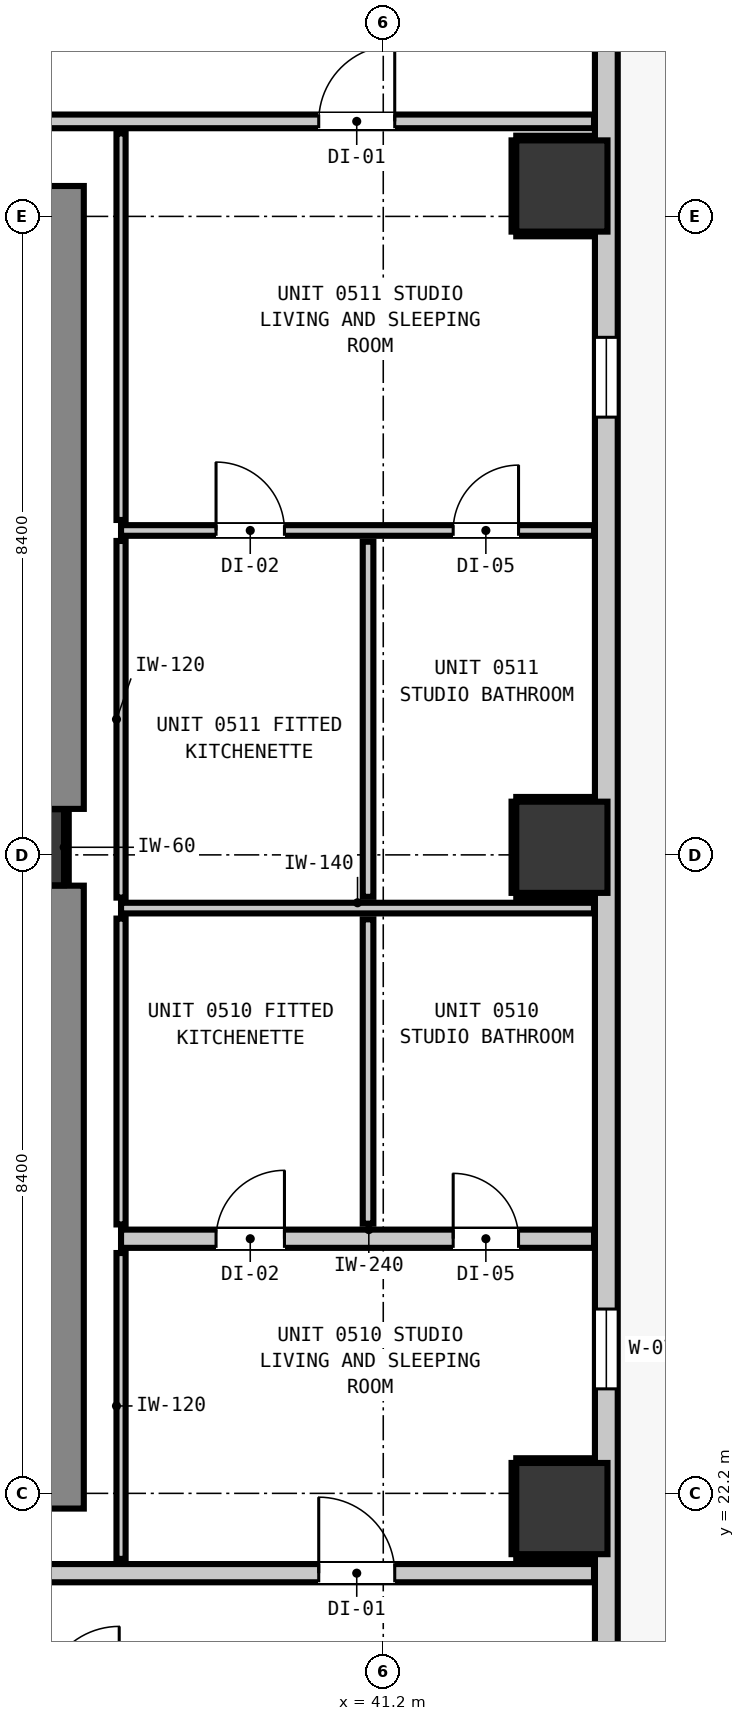
"""IFC4 building model, lengths in metres.
Left out: names, types, materials, properties, quantities, classifications, styles, units other than length and angle.
Written with IfcOpenShell. Run it as: python <this file> out.ifc"""

import sys

from ifc_helpers import new_model, si_unit, direction, frame, frame_2d, origin, origin_2d, place, context, subcontext, project, spatial, rectangle, extrude, element, fill, save


model = new_model("IFC4")
c1 = context("Model", 3, precision=1e-05, world=origin(), true_north=direction((0.0, 1.0)))
c2 = subcontext(c1, "Body", "Model", "MODEL_VIEW")
j1 = project(units=[si_unit("LENGTHUNIT", "METRE"), si_unit("PLANEANGLEUNIT", "RADIAN")], contexts=[c1])
p1 = place(None, origin())
s1 = spatial("IfcSite", under=j1, at=p1, CompositionType="ELEMENT")
p2 = place(p1, origin())
s2 = spatial("IfcBuilding", under=s1, at=p2, CompositionType="ELEMENT")
p3 = place(p2, frame((0.0, 0.0, 22.0)))
s3 = spatial("IfcBuildingStorey", under=s2, at=p3, CompositionType="ELEMENT", Elevation=22.0)
p4 = place(p3, frame((36.5, 30.7, 0.0), z_axis=(0.0, 0.0, 1.0), x_axis=(1.0, 0.0, 0.0)))
e1 = element("IfcColumn", 1, at=p4, inside=s3, PredefinedType="COLUMN", context=c2, shape_type="SweptSolid", body=[
    extrude(rectangle(XDim=1.0, YDim=1.0, at=origin_2d()), origin(), (0.0, 0.0, 1.0), 3.32),
])
p5 = place(p3, frame((36.66, 22.0, 0.0), z_axis=(0.0, 0.0, 1.0), x_axis=(0.0, 1.0, 0.0)))
e2 = element("IfcWall", 2, at=p5, inside=s3, PredefinedType="SHEAR", context=c2, shape_type="SweptSolid", body=[
    extrude(rectangle(XDim=8.195, YDim=1.2, at=frame_2d((4.098, 0.0))), origin(), (0.0, 0.0, 1.0), 3.32),
])
p6 = place(p3, frame((36.66, 31.205, 0.0), z_axis=(0.0, 0.0, 1.0), x_axis=(0.0, 1.0, 0.0)))
e3 = element("IfcWall", 3, at=p6, inside=s3, PredefinedType="SHEAR", context=c2, shape_type="SweptSolid", body=[
    extrude(rectangle(XDim=8.195, YDim=1.2, at=frame_2d((4.097, 0.0))), origin(), (0.0, 0.0, 1.0), 3.32),
])
for number, where, z_axis, x_axis in (
    (4, (43.55, 22.0, -0.2), (0.0, 0.0, 1.0), (1.0, 0.0, 0.0)),
    (5, (43.55, 30.7, -0.2), (0.0, 0.0, 1.0), (1.0, 0.0, 0.0)),
    (6, (43.55, 39.4, -0.2), (0.0, 0.0, 1.0), (1.0, 0.0, 0.0)),
):
    element("IfcColumn", number, at=place(p3, frame(where, z_axis=z_axis, x_axis=x_axis)), inside=s3, PredefinedType="COLUMN", context=c2, shape_type="SweptSolid", body=[
        extrude(rectangle(XDim=1.2, YDim=1.2, at=origin_2d()), origin(), (0.0, 0.0, 1.0), 3.52),
    ])
p7 = place(p3, frame((44.135, 44.835, 0.0), z_axis=(0.0, 0.0, 1.0), x_axis=(0.0, -1.0, 0.0)))
e7 = element("IfcWall", 7, at=p7, inside=s3, PredefinedType="STANDARD", context=c2, shape_type="SweptSolid", body=[
    extrude(rectangle(XDim=34.67, YDim=0.3, at=frame_2d((17.335, 0.0))), origin(), (0.0, 0.0, 1.0), 3.06),
])
p8 = place(p7, frame((0.501, 0.0, 0.0)))
e8 = element("IfcOpeningElement", 8, at=p8, cuts=e7, PredefinedType="OPENING", context=c2, shape_type="SweptSolid", body=[
    extrude(rectangle(XDim=1.1, YDim=2.15, at=frame_2d((0.55, 1.075))), frame((0.0, 0.16, 0.0), z_axis=(0.0, -1.0, 0.0), x_axis=(1.0, 0.0, 0.0)), (0.0, 0.0, 1.0), 0.32),
])
p9 = place(p7, frame((20.21, 0.0, 0.85)))
e9 = element("IfcOpeningElement", 9, at=p9, cuts=e7, PredefinedType="OPENING", context=c2, shape_type="SweptSolid", body=[
    extrude(rectangle(XDim=1.05, YDim=1.65, at=frame_2d((0.525, 0.825))), frame((0.0, 0.16, 0.0), z_axis=(0.0, -1.0, 0.0), x_axis=(1.0, 0.0, 0.0)), (0.0, 0.0, 1.0), 0.32),
])
p10 = place(p7, frame((7.426, 0.0, 0.85)))
e10 = element("IfcOpeningElement", 10, at=p10, cuts=e7, PredefinedType="OPENING", context=c2, shape_type="SweptSolid", body=[
    extrude(rectangle(XDim=1.05, YDim=1.65, at=frame_2d((0.525, 0.825))), frame((0.0, 0.16, 0.0), z_axis=(0.0, -1.0, 0.0), x_axis=(1.0, 0.0, 0.0)), (0.0, 0.0, 1.0), 0.32),
])
p11 = place(p3, frame((1.827, 21.15, 0.0), z_axis=(0.0, 0.0, 1.0), x_axis=(1.0, 0.0, 0.0)))
e11 = element("IfcWall", 11, at=p11, inside=s3, PredefinedType="PARTITIONING", context=c2, shape_type="SweptSolid", body=[
    extrude(rectangle(XDim=42.146, YDim=0.24, at=frame_2d((21.073, 0.0))), origin(), (0.0, 0.0, 1.0), 3.06),
])
p12 = place(p11, frame((16.383, 0.0, 0.0)))
e12 = element("IfcOpeningElement", 12, at=p12, cuts=e11, PredefinedType="OPENING", context=c2, shape_type="SweptSolid", body=[
    extrude(rectangle(XDim=1.1, YDim=2.15, at=frame_2d((0.55, 1.075))), frame((0.0, 0.13, 0.0), z_axis=(0.0, -1.0, 0.0), x_axis=(1.0, 0.0, 0.0)), (0.0, 0.0, 1.0), 0.26),
])
p13 = place(p11, frame((8.647, 0.0, 0.0)))
e13 = element("IfcOpeningElement", 13, at=p13, cuts=e11, PredefinedType="OPENING", context=c2, shape_type="SweptSolid", body=[
    extrude(rectangle(XDim=1.4, YDim=2.15, at=frame_2d((0.7, 1.075))), frame((0.0, 0.13, 0.0), z_axis=(0.0, -1.0, 0.0), x_axis=(1.0, 0.0, 0.0)), (0.0, 0.0, 1.0), 0.26),
])
p14 = place(p11, frame((38.524, 0.0, 0.0)))
e14 = element("IfcOpeningElement", 14, at=p14, cuts=e11, PredefinedType="OPENING", context=c2, shape_type="SweptSolid", body=[
    extrude(rectangle(XDim=1.0, YDim=2.15, at=frame_2d((0.5, 1.075))), frame((0.0, 0.13, 0.0), z_axis=(0.0, -1.0, 0.0), x_axis=(1.0, 0.0, 0.0)), (0.0, 0.0, 1.0), 0.26),
])
p15 = place(p3, frame((37.75, 25.55, 0.0), z_axis=(0.0, 0.0, 1.0), x_axis=(1.0, 0.0, 0.0)))
e15 = element("IfcWall", 15, at=p15, inside=s3, PredefinedType="PARTITIONING", context=c2, shape_type="SweptSolid", body=[
    extrude(rectangle(XDim=6.223, YDim=0.24, at=frame_2d((3.111, 0.0))), origin(), (0.0, 0.0, 1.0), 3.06),
])
p16 = place(p15, frame((1.25, 0.0, 0.0)))
e16 = element("IfcOpeningElement", 16, at=p16, cuts=e15, PredefinedType="OPENING", context=c2, shape_type="SweptSolid", body=[
    extrude(rectangle(XDim=0.9, YDim=2.1, at=frame_2d((0.45, 1.05))), frame((0.0, 0.13, 0.0), z_axis=(0.0, -1.0, 0.0), x_axis=(1.0, 0.0, 0.0)), (0.0, 0.0, 1.0), 0.26),
])
p17 = place(p15, frame((4.37, 0.0, 0.0)))
e17 = element("IfcOpeningElement", 17, at=p17, cuts=e15, PredefinedType="OPENING", context=c2, shape_type="SweptSolid", body=[
    extrude(rectangle(XDim=0.86, YDim=2.02, at=frame_2d((0.43, 1.01))), frame((0.0, 0.13, 0.0), z_axis=(0.0, -1.0, 0.0), x_axis=(1.0, 0.0, 0.0)), (0.0, 0.0, 1.0), 0.26),
])
p18 = place(p3, frame((12.989, 40.25, 0.0), z_axis=(0.0, 0.0, 1.0), x_axis=(1.0, 0.0, 0.0)))
e18 = element("IfcWall", 18, at=p18, inside=s3, PredefinedType="PARTITIONING", context=c2, shape_type="SweptSolid", body=[
    extrude(rectangle(XDim=30.984, YDim=0.18, at=frame_2d((15.492, 0.0))), origin(), (0.0, 0.0, 1.0), 3.06),
])
p19 = place(p18, frame((4.446, 0.0, 0.0)))
e19 = element("IfcOpeningElement", 19, at=p19, cuts=e18, PredefinedType="OPENING", context=c2, shape_type="SweptSolid", body=[
    extrude(rectangle(XDim=1.4, YDim=2.15, at=frame_2d((0.7, 1.075))), frame((0.0, 0.1, 0.0), z_axis=(0.0, -1.0, 0.0), x_axis=(1.0, 0.0, 0.0)), (0.0, 0.0, 1.0), 0.2),
])
p20 = place(p18, frame((27.362, 0.0, 0.0)))
e20 = element("IfcOpeningElement", 20, at=p20, cuts=e18, PredefinedType="OPENING", context=c2, shape_type="SweptSolid", body=[
    extrude(rectangle(XDim=1.0, YDim=2.15, at=frame_2d((0.5, 1.075))), frame((0.0, 0.1, 0.0), z_axis=(0.0, -1.0, 0.0), x_axis=(1.0, 0.0, 0.0)), (0.0, 0.0, 1.0), 0.2),
])
p21 = place(p3, frame((37.75, 29.9, 0.0), z_axis=(0.0, 0.0, 1.0), x_axis=(1.0, 0.0, 0.0)))
e21 = element("IfcWall", 21, at=p21, inside=s3, PredefinedType="PARTITIONING", context=c2, shape_type="SweptSolid", body=[
    extrude(rectangle(XDim=6.223, YDim=0.14, at=frame_2d((3.111, 0.0))), origin(), (0.0, 0.0, 1.0), 3.06),
])
p22 = place(p3, frame((37.75, 34.868, 0.0), z_axis=(0.0, 0.0, 1.0), x_axis=(1.0, 0.0, 0.0)))
e22 = element("IfcWall", 22, at=p22, inside=s3, PredefinedType="PARTITIONING", context=c2, shape_type="SweptSolid", body=[
    extrude(rectangle(XDim=6.223, YDim=0.14, at=frame_2d((3.111, 0.0))), origin(), (0.0, 0.0, 1.0), 3.06),
])
p23 = place(p22, frame((1.25, 0.0, 0.0)))
e23 = element("IfcOpeningElement", 23, at=p23, cuts=e22, PredefinedType="OPENING", context=c2, shape_type="SweptSolid", body=[
    extrude(rectangle(XDim=0.9, YDim=2.1, at=frame_2d((0.45, 1.05))), frame((0.0, 0.08, 0.0), z_axis=(0.0, -1.0, 0.0), x_axis=(1.0, 0.0, 0.0)), (0.0, 0.0, 1.0), 0.16),
])
p24 = place(p22, frame((4.37, 0.0, 0.0)))
e24 = element("IfcOpeningElement", 24, at=p24, cuts=e22, PredefinedType="OPENING", context=c2, shape_type="SweptSolid", body=[
    extrude(rectangle(XDim=0.86, YDim=2.02, at=frame_2d((0.43, 1.01))), frame((0.0, 0.08, 0.0), z_axis=(0.0, -1.0, 0.0), x_axis=(1.0, 0.0, 0.0)), (0.0, 0.0, 1.0), 0.16),
])
p25 = place(p3, frame((41.0, 25.748, 0.0), z_axis=(0.0, 0.0, 1.0), x_axis=(0.0, 1.0, 0.0)))
e25 = element("IfcWall", 25, at=p25, inside=s3, PredefinedType="PARTITIONING", context=c2, shape_type="SweptSolid", body=[
    extrude(rectangle(XDim=4.004, YDim=0.14, at=frame_2d((2.002, 0.0))), origin(), (0.0, 0.0, 1.0), 3.06),
])
p26 = place(p3, frame((41.0, 30.048, 0.0), z_axis=(0.0, 0.0, 1.0), x_axis=(0.0, 1.0, 0.0)))
e26 = element("IfcWall", 26, at=p26, inside=s3, PredefinedType="PARTITIONING", context=c2, shape_type="SweptSolid", body=[
    extrude(rectangle(XDim=4.672, YDim=0.14, at=frame_2d((2.336, 0.0))), origin(), (0.0, 0.0, 1.0), 3.06),
])
p27 = place(p3, frame((37.75, 21.338, 0.0), z_axis=(0.0, 0.0, 1.0), x_axis=(0.0, 1.0, 0.0)))
e27 = element("IfcWall", 27, at=p27, inside=s3, PredefinedType="PARTITIONING", context=c2, shape_type="SweptSolid", body=[
    extrude(rectangle(XDim=4.024, YDim=0.12, at=frame_2d((2.012, 0.0))), origin(), (0.0, 0.0, 1.0), 3.06),
])
p28 = place(p3, frame((37.75, 25.738, 0.0), z_axis=(0.0, 0.0, 1.0), x_axis=(0.0, 1.0, 0.0)))
e28 = element("IfcWall", 28, at=p28, inside=s3, PredefinedType="PARTITIONING", context=c2, shape_type="SweptSolid", body=[
    extrude(rectangle(XDim=4.024, YDim=0.12, at=frame_2d((2.012, 0.0))), origin(), (0.0, 0.0, 1.0), 3.06),
])
p29 = place(p3, frame((37.75, 30.038, 0.0), z_axis=(0.0, 0.0, 1.0), x_axis=(0.0, 1.0, 0.0)))
e29 = element("IfcWall", 29, at=p29, inside=s3, PredefinedType="PARTITIONING", context=c2, shape_type="SweptSolid", body=[
    extrude(rectangle(XDim=4.692, YDim=0.12, at=frame_2d((2.346, 0.0))), origin(), (0.0, 0.0, 1.0), 3.06),
])
p30 = place(p3, frame((37.75, 35.006, 0.0), z_axis=(0.0, 0.0, 1.0), x_axis=(0.0, 1.0, 0.0)))
e30 = element("IfcWall", 30, at=p30, inside=s3, PredefinedType="PARTITIONING", context=c2, shape_type="SweptSolid", body=[
    extrude(rectangle(XDim=5.086, YDim=0.12, at=frame_2d((2.543, 0.0))), origin(), (0.0, 0.0, 1.0), 3.06),
])
p31 = place(p3, frame((37.032, 30.21, 0.0), z_axis=(0.0, 0.0, 1.0), x_axis=(0.0, 1.0, 0.0)))
e31 = element("IfcWall", 31, at=p31, inside=s3, PredefinedType="PARTITIONING", context=c2, shape_type="SweptSolid", body=[
    extrude(rectangle(XDim=0.98, YDim=0.06, at=frame_2d((0.49, 0.0))), origin(), (0.0, 0.0, 1.0), 1.45),
])
for number, where, z_axis, x_axis in (
    (32, (42.95, 21.368, 0.0), (0.0, 0.0, 1.0), (1.0, 0.0, 0.0)),
    (33, (42.95, 22.632, 0.0), (0.0, 0.0, 1.0), (1.0, 0.0, 0.0)),
):
    element("IfcWall", number, at=place(p3, frame(where, z_axis=z_axis, x_axis=x_axis)), inside=s3, PredefinedType="PARTITIONING", context=c2, shape_type="SweptSolid", body=[
        extrude(rectangle(XDim=1.02, YDim=0.06, at=frame_2d((0.51, 0.0))), origin(), (0.0, 0.0, 1.0), 1.45),
    ])
p32 = place(p3, frame((42.918, 21.4, 0.0), z_axis=(0.0, 0.0, 1.0), x_axis=(0.0, 1.0, 0.0)))
e34 = element("IfcWall", 34, at=p32, inside=s3, PredefinedType="PARTITIONING", context=c2, shape_type="SweptSolid", body=[
    extrude(rectangle(XDim=1.2, YDim=0.06, at=frame_2d((0.6, 0.0))), origin(), (0.0, 0.0, 1.0), 1.45),
])
for number, where, z_axis, x_axis in (
    (35, (42.95, 30.068, 0.0), (0.0, 0.0, 1.0), (1.0, 0.0, 0.0)),
    (36, (42.95, 31.332, 0.0), (0.0, 0.0, 1.0), (1.0, 0.0, 0.0)),
):
    element("IfcWall", number, at=place(p3, frame(where, z_axis=z_axis, x_axis=x_axis)), inside=s3, PredefinedType="PARTITIONING", context=c2, shape_type="SweptSolid", body=[
        extrude(rectangle(XDim=1.02, YDim=0.06, at=frame_2d((0.51, 0.0))), origin(), (0.0, 0.0, 1.0), 1.45),
    ])
p33 = place(p3, frame((42.918, 30.1, 0.0), z_axis=(0.0, 0.0, 1.0), x_axis=(0.0, 1.0, 0.0)))
e37 = element("IfcWall", 37, at=p33, inside=s3, PredefinedType="PARTITIONING", context=c2, shape_type="SweptSolid", body=[
    extrude(rectangle(XDim=1.2, YDim=0.06, at=frame_2d((0.6, 0.0))), origin(), (0.0, 0.0, 1.0), 1.45),
])
for number, where, z_axis, x_axis in (
    (38, (42.95, 38.768, 0.0), (0.0, 0.0, 1.0), (1.0, 0.0, 0.0)),
    (39, (42.95, 40.032, 0.0), (0.0, 0.0, 1.0), (1.0, 0.0, 0.0)),
):
    element("IfcWall", number, at=place(p3, frame(where, z_axis=z_axis, x_axis=x_axis)), inside=s3, PredefinedType="PARTITIONING", context=c2, shape_type="SweptSolid", body=[
        extrude(rectangle(XDim=1.02, YDim=0.06, at=frame_2d((0.51, 0.0))), origin(), (0.0, 0.0, 1.0), 1.45),
    ])
p34 = place(p3, frame((42.918, 38.8, 0.0), z_axis=(0.0, 0.0, 1.0), x_axis=(0.0, 1.0, 0.0)))
e40 = element("IfcWall", 40, at=p34, inside=s3, PredefinedType="PARTITIONING", context=c2, shape_type="SweptSolid", body=[
    extrude(rectangle(XDim=1.2, YDim=0.06, at=frame_2d((0.6, 0.0))), origin(), (0.0, 0.0, 1.0), 1.45),
])
p35 = place(p9, origin())
e41 = element("IfcWindow", 41, at=p35, inside=s3, PartitioningType="SINGLE_PANEL", PredefinedType="WINDOW", context=c2, shape_type="SweptSolid", body=[
    extrude(rectangle(XDim=1.05, YDim=1.65, at=frame_2d((0.525, 0.825))), frame((0.0, 0.03, 0.0), z_axis=(0.0, -1.0, 0.0), x_axis=(1.0, 0.0, 0.0)), (0.0, 0.0, 1.0), 0.06),
])
fill(e9, e41)
p36 = place(p10, origin())
e42 = element("IfcWindow", 42, at=p36, inside=s3, PartitioningType="SINGLE_PANEL", PredefinedType="WINDOW", context=c2, shape_type="SweptSolid", body=[
    extrude(rectangle(XDim=1.05, YDim=1.65, at=frame_2d((0.525, 0.825))), frame((0.0, 0.03, 0.0), z_axis=(0.0, -1.0, 0.0), x_axis=(1.0, 0.0, 0.0)), (0.0, 0.0, 1.0), 0.06),
])
fill(e10, e42)
p37 = place(p14, origin())
e43 = element("IfcDoor", 43, at=p37, inside=s3, OperationType="SINGLE_SWING_LEFT", PredefinedType="DOOR", context=c2, shape_type="SweptSolid", body=[
    extrude(rectangle(XDim=1.0, YDim=2.15, at=frame_2d((0.5, 1.075))), frame((0.0, 0.025, 0.0), z_axis=(0.0, -1.0, 0.0), x_axis=(1.0, 0.0, 0.0)), (0.0, 0.0, 1.0), 0.05),
])
fill(e14, e43)
p38 = place(p16, origin())
e44 = element("IfcDoor", 44, at=p38, inside=s3, OperationType="SINGLE_SWING_RIGHT", PredefinedType="DOOR", context=c2, shape_type="SweptSolid", body=[
    extrude(rectangle(XDim=0.9, YDim=2.1, at=frame_2d((0.45, 1.05))), frame((0.0, 0.025, 0.0), z_axis=(0.0, -1.0, 0.0), x_axis=(1.0, 0.0, 0.0)), (0.0, 0.0, 1.0), 0.05),
])
fill(e16, e44)
p39 = place(p17, origin())
e45 = element("IfcDoor", 45, at=p39, inside=s3, OperationType="SINGLE_SWING_LEFT", PredefinedType="DOOR", context=c2, shape_type="SweptSolid", body=[
    extrude(rectangle(XDim=0.86, YDim=2.02, at=frame_2d((0.43, 1.01))), frame((0.0, 0.025, 0.0), z_axis=(0.0, -1.0, 0.0), x_axis=(1.0, 0.0, 0.0)), (0.0, 0.0, 1.0), 0.05),
])
fill(e17, e45)
p40 = place(p20, origin())
e46 = element("IfcDoor", 46, at=p40, inside=s3, OperationType="SINGLE_SWING_RIGHT", PredefinedType="DOOR", context=c2, shape_type="SweptSolid", body=[
    extrude(rectangle(XDim=1.0, YDim=2.15, at=frame_2d((0.5, 1.075))), frame((0.0, 0.025, 0.0), z_axis=(0.0, -1.0, 0.0), x_axis=(1.0, 0.0, 0.0)), (0.0, 0.0, 1.0), 0.05),
])
fill(e20, e46)
p41 = place(p23, origin())
e47 = element("IfcDoor", 47, at=p41, inside=s3, OperationType="SINGLE_SWING_LEFT", PredefinedType="DOOR", context=c2, shape_type="SweptSolid", body=[
    extrude(rectangle(XDim=0.9, YDim=2.1, at=frame_2d((0.45, 1.05))), frame((0.0, 0.025, 0.0), z_axis=(0.0, -1.0, 0.0), x_axis=(1.0, 0.0, 0.0)), (0.0, 0.0, 1.0), 0.05),
])
fill(e23, e47)
p42 = place(p24, origin())
e48 = element("IfcDoor", 48, at=p42, inside=s3, OperationType="SINGLE_SWING_RIGHT", PredefinedType="DOOR", context=c2, shape_type="SweptSolid", body=[
    extrude(rectangle(XDim=0.86, YDim=2.02, at=frame_2d((0.43, 1.01))), frame((0.0, 0.025, 0.0), z_axis=(0.0, -1.0, 0.0), x_axis=(1.0, 0.0, 0.0)), (0.0, 0.0, 1.0), 0.05),
])
fill(e24, e48)
save(model, sys.argv[1])
